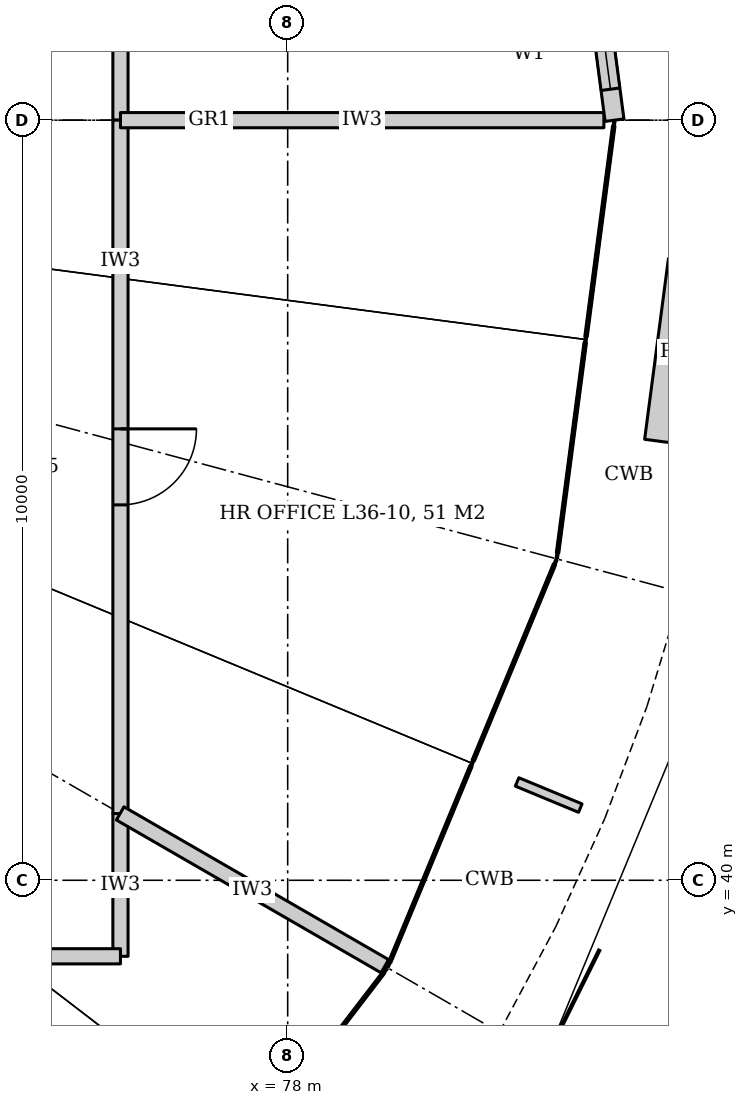
"""IFC4 building model, lengths in metres.
Left out: names, types, materials, properties, quantities, classifications, styles, units other than length and angle.
Written with IfcOpenShell. Run it as: python <this file> out.ifc"""

import sys

from ifc_helpers import new_model, si_unit, direction, frame, frame_2d, origin, place, context, subcontext, project, spatial, rectangle, extrude, element, fill, save


model = new_model("IFC4")
c1 = context("Model", 3, precision=1e-05, world=origin(), true_north=direction((0.0, 1.0)))
c2 = subcontext(c1, "Body", "Model", "MODEL_VIEW")
j1 = project(units=[si_unit("LENGTHUNIT", "METRE"), si_unit("PLANEANGLEUNIT", "RADIAN")], contexts=[c1])
p1 = place(None, origin())
s1 = spatial("IfcSite", under=j1, at=p1, CompositionType="ELEMENT")
p2 = place(p1, origin())
s2 = spatial("IfcBuilding", under=s1, at=p2, CompositionType="ELEMENT")
p3 = place(p2, frame((0.0, 0.0, 160.4)))
s3 = spatial("IfcBuildingStorey", under=s2, at=p3, CompositionType="ELEMENT", Elevation=160.4)
p4 = place(p3, frame((75.8, 59.05, 0.0), z_axis=(0.0, 0.0, 1.0), x_axis=(0.0, -1.0, 0.0)))
e1 = element("IfcWall", 1, at=p4, inside=s3, PredefinedType="PARTITIONING", context=c2, shape_type="SweptSolid", body=[
    extrude(rectangle(XDim=9.05, YDim=0.2, at=frame_2d((4.525, 0.0))), origin(), (0.0, 0.0, 1.0), 3.012),
])
p5 = place(p3, frame((75.8, 50.0, 0.0), z_axis=(0.0, 0.0, 1.0), x_axis=(0.0, -1.0, 0.0)))
e2 = element("IfcWall", 2, at=p5, inside=s3, PredefinedType="PARTITIONING", context=c2, shape_type="SweptSolid", body=[
    extrude(rectangle(XDim=9.122, YDim=0.2, at=frame_2d((4.561, 0.0))), origin(), (0.0, 0.0, 1.0), 3.012),
])
p6 = place(p5, frame((4.061, 0.0, 0.0)))
e3 = element("IfcOpeningElement", 3, at=p6, cuts=e2, PredefinedType="OPENING", context=c2, shape_type="SweptSolid", body=[
    extrude(rectangle(XDim=1.0, YDim=2.1, at=frame_2d((0.5, 1.05))), frame((0.0, 0.11, 0.0), z_axis=(0.0, -1.0, 0.0), x_axis=(1.0, 0.0, 0.0)), (0.0, 0.0, 1.0), 0.22),
])
p7 = place(p3, frame((75.8, 40.878, 0.0), z_axis=(0.0, 0.0, 1.0), x_axis=(0.0, -1.0, 0.0)))
e4 = element("IfcWall", 4, at=p7, inside=s3, PredefinedType="PARTITIONING", context=c2, shape_type="SweptSolid", body=[
    extrude(rectangle(XDim=1.878, YDim=0.2, at=frame_2d((0.939, 0.0))), origin(), (0.0, 0.0, 1.0), 3.012),
])
p8 = place(p3, frame((75.8, 39.0, 0.0), z_axis=(0.0, 0.0, 1.0), x_axis=(-1.0, 0.0, 0.0)))
e5 = element("IfcWall", 5, at=p8, inside=s3, PredefinedType="PARTITIONING", context=c2, shape_type="SweptSolid", body=[
    extrude(rectangle(XDim=2.8, YDim=0.2, at=frame_2d((1.4, 0.0))), origin(), (0.0, 0.0, 1.0), 3.04),
])
p9 = place(p3, frame((75.8, 50.0, 0.0), z_axis=(0.0, 0.0, 1.0), x_axis=(1.0, 0.0, 0.0)))
e6 = element("IfcWall", 6, at=p9, inside=s3, PredefinedType="PARTITIONING", context=c2, shape_type="SweptSolid", body=[
    extrude(rectangle(XDim=6.36, YDim=0.2, at=frame_2d((3.18, 0.0))), origin(), (0.0, 0.0, 1.0), 3.012),
])
p10 = place(p3, frame((75.796, 40.88, 0.0), z_axis=(0.0, 0.0, 1.0), x_axis=(0.866036909293, -0.499980071345, 0.0)))
e7 = element("IfcWall", 7, at=p10, inside=s3, PredefinedType="PARTITIONING", context=c2, shape_type="SweptSolid", body=[
    extrude(rectangle(XDim=4.02, YDim=0.2, at=frame_2d((2.01, 0.0))), origin(), (0.0, 0.0, 1.0), 3.012),
])
p11 = place(p3, frame((82.3, 50.0, 0.0), z_axis=(0.0, 0.0, 1.0), x_axis=(-0.130551062135, 0.99144158687, 0.0)))
e8 = element("IfcWall", 8, at=p11, inside=s3, PredefinedType="SOLIDWALL", context=c2, shape_type="SweptSolid", body=[
    extrude(rectangle(XDim=5.822, YDim=0.25, at=frame_2d((2.911, 0.0))), origin(), (0.0, 0.0, 1.0), 4.04),
])
p12 = place(p11, frame((2.011, 0.0, 0.0)))
e9 = element("IfcOpeningElement", 9, at=p12, cuts=e8, PredefinedType="OPENING", context=c2, shape_type="SweptSolid", body=[
    extrude(rectangle(XDim=1.8, YDim=2.4, at=frame_2d((0.9, 1.2))), frame((0.0, 0.135, 0.0), z_axis=(0.0, -1.0, 0.0), x_axis=(1.0, 0.0, 0.0)), (0.0, 0.0, 1.0), 0.27),
])
p13 = place(p11, frame((0.411, 0.0, 0.0)))
e10 = element("IfcOpeningElement", 10, at=p13, cuts=e8, PredefinedType="OPENING", context=c2, shape_type="SweptSolid", body=[
    extrude(rectangle(XDim=1.2, YDim=2.4, at=frame_2d((0.6, 1.2))), frame((0.0, 0.135, 0.0), z_axis=(0.0, -1.0, 0.0), x_axis=(1.0, 0.0, 0.0)), (0.0, 0.0, 1.0), 0.27),
])
p14 = place(p11, frame((4.211, 0.0, 0.0)))
e11 = element("IfcOpeningElement", 11, at=p14, cuts=e8, PredefinedType="OPENING", context=c2, shape_type="SweptSolid", body=[
    extrude(rectangle(XDim=1.2, YDim=2.4, at=frame_2d((0.6, 1.2))), frame((0.0, 0.135, 0.0), z_axis=(0.0, -1.0, 0.0), x_axis=(1.0, 0.0, 0.0)), (0.0, 0.0, 1.0), 0.27),
])
p15 = place(p6, origin())
e12 = element("IfcDoor", 12, at=p15, inside=s3, OperationType="SINGLE_SWING_LEFT", PredefinedType="DOOR", context=c2, shape_type="SweptSolid", body=[
    extrude(rectangle(XDim=1.0, YDim=2.1, at=frame_2d((0.5, 1.05))), frame((0.0, 0.025, 0.0), z_axis=(0.0, -1.0, 0.0), x_axis=(1.0, 0.0, 0.0)), (0.0, 0.0, 1.0), 0.05),
])
fill(e3, e12)
p16 = place(p13, origin())
e13 = element("IfcWindow", 13, at=p16, inside=s3, PartitioningType="SINGLE_PANEL", PredefinedType="WINDOW", context=c2, shape_type="SweptSolid", body=[
    extrude(rectangle(XDim=1.2, YDim=2.4, at=frame_2d((0.6, 1.2))), frame((0.0, 0.03, 0.0), z_axis=(0.0, -1.0, 0.0), x_axis=(1.0, 0.0, 0.0)), (0.0, 0.0, 1.0), 0.06),
])
fill(e10, e13)
save(model, sys.argv[1])
